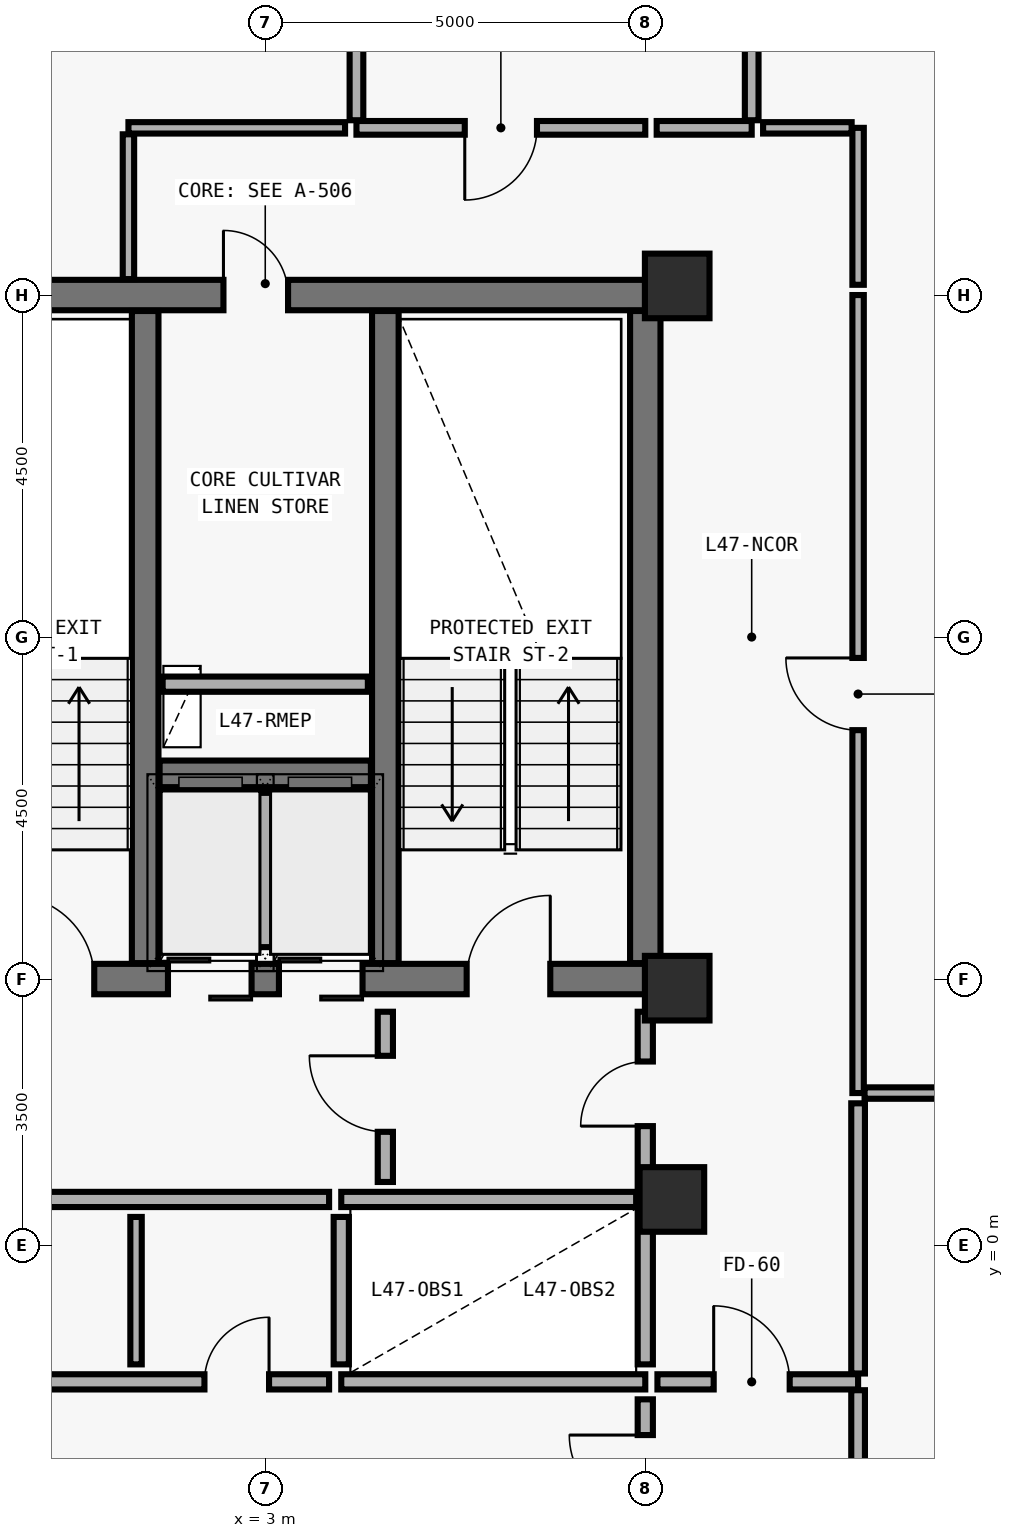
"""IFC4 building model, lengths in metres.
Left out: names, types, materials, properties, quantities, classifications, styles, units other than length and angle.
Written with IfcOpenShell. Run it as: python <this file> out.ifc"""

import sys

from ifc_helpers import new_model, si_unit, direction, frame, frame_2d, origin, origin_2d, place, context, subcontext, project, spatial, rectangle, extrude, element, fill, save


model = new_model("IFC4")
c1 = context("Model", 3, precision=1e-05, world=origin(), true_north=direction((0.0, 1.0)))
c2 = subcontext(c1, "Body", "Model", "MODEL_VIEW")
j1 = project(units=[si_unit("LENGTHUNIT", "METRE"), si_unit("PLANEANGLEUNIT", "RADIAN")], contexts=[c1])
p1 = place(None, origin())
s1 = spatial("IfcSite", under=j1, at=p1, CompositionType="ELEMENT")
p2 = place(p1, origin())
s2 = spatial("IfcBuilding", under=s1, at=p2, CompositionType="ELEMENT")
p3 = place(p2, frame((0.0, 0.0, 189.6)))
s3 = spatial("IfcBuildingStorey", under=s2, at=p3, CompositionType="ELEMENT", Elevation=189.6)
p4 = place(p3, frame((-2.0, 3.5, 0.0), z_axis=(0.0, 0.0, 1.0), x_axis=(1.0, 0.0, 0.0)))
e1 = element("IfcWall", 1, at=p4, inside=s3, PredefinedType="SHEAR", context=c2, shape_type="SweptSolid", body=[
    extrude(rectangle(XDim=10.0, YDim=0.4, at=frame_2d((5.0, 0.0))), origin(), (0.0, 0.0, 1.0), 3.592),
])
p5 = place(p4, frame((1.65, 0.0, 0.0)))
e2 = element("IfcOpeningElement", 2, at=p5, cuts=e1, PredefinedType="OPENING", context=c2, shape_type="SweptSolid", body=[
    extrude(rectangle(XDim=1.1, YDim=2.15, at=frame_2d((0.55, 1.075))), frame((0.0, 0.21, 0.0), z_axis=(0.0, -1.0, 0.0), x_axis=(1.0, 0.0, 0.0)), (0.0, 0.0, 1.0), 0.42),
])
p6 = place(p4, frame((7.65, 0.0, 0.0)))
e3 = element("IfcOpeningElement", 3, at=p6, cuts=e1, PredefinedType="OPENING", context=c2, shape_type="SweptSolid", body=[
    extrude(rectangle(XDim=1.1, YDim=2.15, at=frame_2d((0.55, 1.075))), frame((0.0, 0.21, 0.0), z_axis=(0.0, -1.0, 0.0), x_axis=(1.0, 0.0, 0.0)), (0.0, 0.0, 1.0), 0.42),
])
p7 = place(p4, frame((3.72, 0.0, 0.0)))
e4 = element("IfcOpeningElement", 4, at=p7, cuts=e1, PredefinedType="OPENING", context=c2, shape_type="SweptSolid", body=[
    extrude(rectangle(XDim=1.1, YDim=2.2, at=frame_2d((0.55, 1.1))), frame((0.0, 0.21, 0.0), z_axis=(0.0, -1.0, 0.0), x_axis=(1.0, 0.0, 0.0)), (0.0, 0.0, 1.0), 0.42),
])
p8 = place(p4, frame((5.18, 0.0, 0.0)))
e5 = element("IfcOpeningElement", 5, at=p8, cuts=e1, PredefinedType="OPENING", context=c2, shape_type="SweptSolid", body=[
    extrude(rectangle(XDim=1.1, YDim=2.2, at=frame_2d((0.55, 1.1))), frame((0.0, 0.21, 0.0), z_axis=(0.0, -1.0, 0.0), x_axis=(1.0, 0.0, 0.0)), (0.0, 0.0, 1.0), 0.42),
])
p9 = place(p3, frame((-2.0, 12.5, 0.0), z_axis=(0.0, 0.0, 1.0), x_axis=(1.0, 0.0, 0.0)))
e6 = element("IfcWall", 6, at=p9, inside=s3, PredefinedType="SHEAR", context=c2, shape_type="SweptSolid", body=[
    extrude(rectangle(XDim=10.0, YDim=0.4, at=frame_2d((5.0, 0.0))), origin(), (0.0, 0.0, 1.0), 3.592),
])
p10 = place(p9, frame((4.45, 0.0, 0.0)))
e7 = element("IfcOpeningElement", 7, at=p10, cuts=e6, PredefinedType="OPENING", context=c2, shape_type="SweptSolid", body=[
    extrude(rectangle(XDim=0.85, YDim=2.1, at=frame_2d((0.425, 1.05))), frame((0.0, 0.21, 0.0), z_axis=(0.0, -1.0, 0.0), x_axis=(1.0, 0.0, 0.0)), (0.0, 0.0, 1.0), 0.42),
])
p11 = place(p3, frame((8.0, 3.71, 0.0), z_axis=(0.0, 0.0, 1.0), x_axis=(0.0, 1.0, 0.0)))
e8 = element("IfcWall", 8, at=p11, inside=s3, PredefinedType="SHEAR", context=c2, shape_type="SweptSolid", body=[
    extrude(rectangle(XDim=8.58, YDim=0.4, at=frame_2d((4.29, 0.0))), origin(), (0.0, 0.0, 1.0), 3.592),
])
for number, where, z_axis, x_axis in (
    (9, (1.42, 3.71, 0.0), (0.0, 0.0, 1.0), (0.0, 1.0, 0.0)),
    (10, (4.58, 3.71, 0.0), (0.0, 0.0, 1.0), (0.0, 1.0, 0.0)),
):
    element("IfcWall", number, at=place(p3, frame(where, z_axis=z_axis, x_axis=x_axis)), inside=s3, PredefinedType="SHEAR", context=c2, shape_type="SweptSolid", body=[
        extrude(rectangle(XDim=8.58, YDim=0.35, at=frame_2d((4.29, 0.0))), origin(), (0.0, 0.0, 1.0), 3.592),
    ])
p12 = place(p3, frame((1.61, 6.2, 0.0), z_axis=(0.0, 0.0, 1.0), x_axis=(1.0, 0.0, 0.0)))
e11 = element("IfcWall", 11, at=p12, inside=s3, PredefinedType="SHEAR", context=c2, shape_type="SweptSolid", body=[
    extrude(rectangle(XDim=2.78, YDim=0.35, at=frame_2d((1.39, 0.0))), origin(), (0.0, 0.0, 1.0), 3.592),
])
for number, where, z_axis, x_axis in (
    (12, (8.42, 12.62, 0.0), (0.0, 0.0, 1.0), (1.0, 0.0, 0.0)),
    (13, (8.42, 3.38, 0.0), (0.0, 0.0, 1.0), (1.0, 0.0, 0.0)),
    (14, (8.35, 0.6, 0.0), (0.0, 0.0, 1.0), (1.0, 0.0, 0.0)),
):
    element("IfcColumn", number, at=place(p3, frame(where, z_axis=z_axis, x_axis=x_axis)), inside=s3, PredefinedType="COLUMN", context=c2, shape_type="SweptSolid", body=[
        extrude(rectangle(XDim=0.85, YDim=0.85, at=origin_2d()), origin(), (0.0, 0.0, 1.0), 3.575),
    ])
p13 = place(p3, frame((3.0, 3.92, 0.0), z_axis=(0.0, 0.0, 1.0), x_axis=(0.0, 1.0, 0.0)))
e15 = element("IfcWall", 15, at=p13, inside=s3, PredefinedType="SOLIDWALL", context=c2, shape_type="SweptSolid", body=[
    extrude(rectangle(XDim=2.03, YDim=0.2, at=frame_2d((1.015, 0.0))), origin(), (0.0, 0.0, 1.0), 3.36),
])
p14 = place(p3, frame((1.65, 7.38, 0.0), z_axis=(0.0, 0.0, 1.0), x_axis=(1.0, 0.0, 0.0)))
e16 = element("IfcWall", 16, at=p14, inside=s3, PredefinedType="SOLIDWALL", context=c2, shape_type="SweptSolid", body=[
    extrude(rectangle(XDim=2.7, YDim=0.2, at=frame_2d((1.35, 0.0))), origin(), (0.0, 0.0, 1.0), 3.36),
])
p15 = place(p3, frame((4.0, 0.6, 0.0), z_axis=(0.0, 0.0, 1.0), x_axis=(1.0, 0.0, 0.0)))
e17 = element("IfcWall", 17, at=p15, inside=s3, PredefinedType="SOLIDWALL", context=c2, shape_type="SweptSolid", body=[
    extrude(rectangle(XDim=3.88, YDim=0.2, at=frame_2d((1.94, 0.0))), origin(), (0.0, 0.0, 1.0), 3.012),
])
p16 = place(p3, frame((4.0, -1.8, 0.0), z_axis=(0.0, 0.0, 1.0), x_axis=(1.0, 0.0, 0.0)))
e18 = element("IfcWall", 18, at=p16, inside=s3, PredefinedType="SOLIDWALL", context=c2, shape_type="SweptSolid", body=[
    extrude(rectangle(XDim=4.0, YDim=0.2, at=frame_2d((2.0, 0.0))), origin(), (0.0, 0.0, 1.0), 3.36),
])
p17 = place(p3, frame((4.0, -1.57, 0.0), z_axis=(0.0, 0.0, 1.0), x_axis=(0.0, 1.0, 0.0)))
e19 = element("IfcWall", 19, at=p17, inside=s3, PredefinedType="SOLIDWALL", context=c2, shape_type="SweptSolid", body=[
    extrude(rectangle(XDim=1.94, YDim=0.2, at=frame_2d((0.97, 0.0))), origin(), (0.0, 0.0, 1.0), 3.36),
])
p18 = place(p3, frame((8.0, -1.57, 0.0), z_axis=(0.0, 0.0, 1.0), x_axis=(0.0, 1.0, 0.0)))
e20 = element("IfcWall", 20, at=p18, inside=s3, PredefinedType="SOLIDWALL", context=c2, shape_type="SweptSolid", body=[
    extrude(rectangle(XDim=2.05, YDim=0.2, at=frame_2d((1.025, 0.0))), origin(), (0.0, 0.0, 1.0), 3.012),
])
p19 = place(p3, frame((4.58, 0.83, 0.0), z_axis=(0.0, 0.0, 1.0), x_axis=(0.0, 1.0, 0.0)))
e21 = element("IfcWall", 21, at=p19, inside=s3, PredefinedType="MOVABLE", context=c2, shape_type="SweptSolid", body=[
    extrude(rectangle(XDim=2.24, YDim=0.2, at=frame_2d((1.12, 0.0))), origin(), (0.0, 0.0, 1.0), 3.36),
])
p20 = place(p19, frame((0.66, 0.0, 0.0)))
e22 = element("IfcOpeningElement", 22, at=p20, cuts=e21, PredefinedType="OPENING", context=c2, shape_type="SweptSolid", body=[
    extrude(rectangle(XDim=1.0, YDim=2.1, at=frame_2d((0.5, 1.05))), frame((0.0, 0.11, 0.0), z_axis=(0.0, -1.0, 0.0), x_axis=(1.0, 0.0, 0.0)), (0.0, 0.0, 1.0), 0.22),
])
p21 = place(p3, frame((8.0, 0.72, 0.0), z_axis=(0.0, 0.0, 1.0), x_axis=(0.0, 1.0, 0.0)))
e23 = element("IfcWall", 23, at=p21, inside=s3, PredefinedType="MOVABLE", context=c2, shape_type="SweptSolid", body=[
    extrude(rectangle(XDim=2.35, YDim=0.2, at=frame_2d((1.175, 0.0))), origin(), (0.0, 0.0, 1.0), 2.692),
])
p22 = place(p21, frame((0.845, 0.0, 0.0)))
e24 = element("IfcOpeningElement", 24, at=p22, cuts=e23, PredefinedType="OPENING", context=c2, shape_type="SweptSolid", body=[
    extrude(rectangle(XDim=0.85, YDim=2.1, at=frame_2d((0.425, 1.05))), frame((0.0, 0.11, 0.0), z_axis=(0.0, -1.0, 0.0), x_axis=(1.0, 0.0, 0.0)), (0.0, 0.0, 1.0), 0.22),
])
p23 = place(p3, frame((8.0, -3.97, 0.0), z_axis=(0.0, 0.0, 1.0), x_axis=(0.0, 1.0, 0.0)))
e25 = element("IfcWall", 25, at=p23, inside=s3, PredefinedType="MOVABLE", context=c2, shape_type="SweptSolid", body=[
    extrude(rectangle(XDim=1.94, YDim=0.2, at=frame_2d((0.97, 0.0))), origin(), (0.0, 0.0, 1.0), 3.012),
])
p24 = place(p23, frame((0.47, 0.0, 0.0)))
e26 = element("IfcOpeningElement", 26, at=p24, cuts=e25, PredefinedType="OPENING", context=c2, shape_type="SweptSolid", body=[
    extrude(rectangle(XDim=1.0, YDim=2.1, at=frame_2d((0.5, 1.05))), frame((0.0, 0.11, 0.0), z_axis=(0.0, -1.0, 0.0), x_axis=(1.0, 0.0, 0.0)), (0.0, 0.0, 1.0), 0.22),
])
p25 = place(p3, frame((-2.0, -1.8, 0.0), z_axis=(0.0, 0.0, 1.0), x_axis=(1.0, 0.0, 0.0)))
e27 = element("IfcWall", 27, at=p25, inside=s3, PredefinedType="MOVABLE", context=c2, shape_type="SweptSolid", body=[
    extrude(rectangle(XDim=5.84, YDim=0.2, at=frame_2d((2.92, 0.0))), origin(), (0.0, 0.0, 1.0), 3.36),
])
p26 = place(p25, frame((1.15, 0.0, 0.0)))
e28 = element("IfcOpeningElement", 28, at=p26, cuts=e27, PredefinedType="OPENING", context=c2, shape_type="SweptSolid", body=[
    extrude(rectangle(XDim=0.85, YDim=2.1, at=frame_2d((0.425, 1.05))), frame((0.0, 0.11, 0.0), z_axis=(0.0, -1.0, 0.0), x_axis=(1.0, 0.0, 0.0)), (0.0, 0.0, 1.0), 0.22),
])
p27 = place(p25, frame((4.2, 0.0, 0.0)))
e29 = element("IfcOpeningElement", 29, at=p27, cuts=e27, PredefinedType="OPENING", context=c2, shape_type="SweptSolid", body=[
    extrude(rectangle(XDim=0.85, YDim=2.1, at=frame_2d((0.425, 1.05))), frame((0.0, 0.11, 0.0), z_axis=(0.0, -1.0, 0.0), x_axis=(1.0, 0.0, 0.0)), (0.0, 0.0, 1.0), 0.22),
])
p28 = place(p3, frame((8.16, -1.8, 0.0), z_axis=(0.0, 0.0, 1.0), x_axis=(1.0, 0.0, 0.0)))
e30 = element("IfcWall", 30, at=p28, inside=s3, PredefinedType="MOVABLE", context=c2, shape_type="SweptSolid", body=[
    extrude(rectangle(XDim=2.64, YDim=0.2, at=frame_2d((1.32, 0.0))), origin(), (0.0, 0.0, 1.0), 3.36),
])
p29 = place(p28, frame((0.74, 0.0, 0.0)))
e31 = element("IfcOpeningElement", 31, at=p29, cuts=e30, PredefinedType="OPENING", context=c2, shape_type="SweptSolid", body=[
    extrude(rectangle(XDim=1.0, YDim=2.1, at=frame_2d((0.5, 1.05))), frame((0.0, 0.11, 0.0), z_axis=(0.0, -1.0, 0.0), x_axis=(1.0, 0.0, 0.0)), (0.0, 0.0, 1.0), 0.22),
])
p30 = place(p3, frame((8.0, 14.7, 0.0), z_axis=(0.0, 0.0, 1.0), x_axis=(-1.0, 0.0, 0.0)))
e32 = element("IfcWall", 32, at=p30, inside=s3, PredefinedType="PLUMBINGWALL", context=c2, shape_type="SweptSolid", body=[
    extrude(rectangle(XDim=3.8, YDim=0.18, at=frame_2d((1.9, 0.0))), origin(), (0.0, 0.0, 1.0), 3.012),
])
p31 = place(p30, frame((1.425, 0.0, 0.0)))
e33 = element("IfcOpeningElement", 33, at=p31, cuts=e32, PredefinedType="OPENING", context=c2, shape_type="SweptSolid", body=[
    extrude(rectangle(XDim=0.95, YDim=2.1, at=frame_2d((0.475, 1.05))), frame((0.0, 0.1, 0.0), z_axis=(0.0, -1.0, 0.0), x_axis=(1.0, 0.0, 0.0)), (0.0, 0.0, 1.0), 0.2),
])
p32 = place(p3, frame((10.8, -6.6, 0.0), z_axis=(0.0, 0.0, 1.0), x_axis=(0.0, 1.0, 0.0)))
e34 = element("IfcWall", 34, at=p32, inside=s3, PredefinedType="PLUMBINGWALL", context=c2, shape_type="SweptSolid", body=[
    extrude(rectangle(XDim=4.69, YDim=0.18, at=frame_2d((2.345, 0.0))), origin(), (0.0, 0.0, 1.0), 3.36),
])
p33 = place(p32, frame((1.925, 0.0, 0.0)))
e35 = element("IfcOpeningElement", 35, at=p33, cuts=e34, PredefinedType="OPENING", context=c2, shape_type="SweptSolid", body=[
    extrude(rectangle(XDim=0.95, YDim=2.1, at=frame_2d((0.475, 1.05))), frame((0.0, 0.1, 0.0), z_axis=(0.0, -1.0, 0.0), x_axis=(1.0, 0.0, 0.0)), (0.0, 0.0, 1.0), 0.2),
])
p34 = place(p3, frame((10.8, 2.0, 0.0), z_axis=(0.0, 0.0, 1.0), x_axis=(0.0, 1.0, 0.0)))
e36 = element("IfcWall", 36, at=p34, inside=s3, PredefinedType="PARTITIONING", context=c2, shape_type="SweptSolid", body=[
    extrude(rectangle(XDim=10.5, YDim=0.15, at=frame_2d((5.25, 0.0))), origin(), (0.0, 0.0, 1.0), 3.36),
])
p35 = place(p34, frame((4.775, 0.0, 0.0)))
e37 = element("IfcOpeningElement", 37, at=p35, cuts=e36, PredefinedType="OPENING", context=c2, shape_type="SweptSolid", body=[
    extrude(rectangle(XDim=0.95, YDim=2.1, at=frame_2d((0.475, 1.05))), frame((0.0, 0.085, 0.0), z_axis=(0.0, -1.0, 0.0), x_axis=(1.0, 0.0, 0.0)), (0.0, 0.0, 1.0), 0.17),
])
p36 = place(p3, frame((-1.88, 0.6, 0.0), z_axis=(0.0, 0.0, 1.0), x_axis=(1.0, 0.0, 0.0)))
e38 = element("IfcWall", 38, at=p36, inside=s3, PredefinedType="MOVABLE", context=c2, shape_type="SweptSolid", body=[
    extrude(rectangle(XDim=5.72, YDim=0.2, at=frame_2d((2.86, 0.0))), origin(), (0.0, 0.0, 1.0), 3.012),
])
p37 = place(p3, frame((1.3, -1.57, 0.0), z_axis=(0.0, 0.0, 1.0), x_axis=(0.0, 1.0, 0.0)))
e39 = element("IfcWall", 39, at=p37, inside=s3, PredefinedType="PARTITIONING", context=c2, shape_type="SweptSolid", body=[
    extrude(rectangle(XDim=1.94, YDim=0.15, at=frame_2d((0.97, 0.0))), origin(), (0.0, 0.0, 1.0), 3.36),
])
p38 = place(p3, frame((9.4, 14.7, 0.0), z_axis=(0.0, 0.0, 1.0), x_axis=(-1.0, 0.0, 0.0)))
e40 = element("IfcWall", 40, at=p38, inside=s3, PredefinedType="PLUMBINGWALL", context=c2, shape_type="SweptSolid", body=[
    extrude(rectangle(XDim=1.25, YDim=0.18, at=frame_2d((0.625, 0.0))), origin(), (0.0, 0.0, 1.0), 3.012),
])
p39 = place(p3, frame((4.05, 14.7, 0.0), z_axis=(0.0, 0.0, 1.0), x_axis=(-1.0, 0.0, 0.0)))
e41 = element("IfcWall", 41, at=p39, inside=s3, PredefinedType="PARTITIONING", context=c2, shape_type="SweptSolid", body=[
    extrude(rectangle(XDim=2.85, YDim=0.15, at=frame_2d((1.425, 0.0))), origin(), (0.0, 0.0, 1.0), 3.012),
])
p40 = place(p3, frame((1.2, 14.615, 0.0), z_axis=(0.0, 0.0, 1.0), x_axis=(0.0, -1.0, 0.0)))
e42 = element("IfcWall", 42, at=p40, inside=s3, PredefinedType="PARTITIONING", context=c2, shape_type="SweptSolid", body=[
    extrude(rectangle(XDim=1.905, YDim=0.15, at=frame_2d((0.953, 0.0))), origin(), (0.0, 0.0, 1.0), 3.36),
])
p41 = place(p3, frame((4.2, 18.838, 0.0), z_axis=(0.0, 0.0, 1.0), x_axis=(0.0, -1.0, 0.0)))
e43 = element("IfcWall", 43, at=p41, inside=s3, PredefinedType="PLUMBINGWALL", context=c2, shape_type="SweptSolid", body=[
    extrude(rectangle(XDim=4.038, YDim=0.18, at=frame_2d((2.019, 0.0))), origin(), (0.0, 0.0, 1.0), 3.36),
])
p42 = place(p3, frame((10.8, -1.69, 0.0), z_axis=(0.0, 0.0, 1.0), x_axis=(0.0, 1.0, 0.0)))
e44 = element("IfcWall", 44, at=p42, inside=s3, PredefinedType="PLUMBINGWALL", context=c2, shape_type="SweptSolid", body=[
    extrude(rectangle(XDim=3.555, YDim=0.18, at=frame_2d((1.777, 0.0))), origin(), (0.0, 0.0, 1.0), 3.36),
])
p43 = place(p3, frame((10.885, 2.0, 0.0), z_axis=(0.0, 0.0, 1.0), x_axis=(1.0, 0.0, 0.0)))
e45 = element("IfcWall", 45, at=p43, inside=s3, PredefinedType="PARTITIONING", context=c2, shape_type="SweptSolid", body=[
    extrude(rectangle(XDim=13.559, YDim=0.15, at=frame_2d((6.78, 0.0))), origin(), (0.0, 0.0, 1.0), 3.36),
])
p44 = place(p3, frame((10.8, 12.635, 0.0), z_axis=(0.0, 0.0, 1.0), x_axis=(0.0, 1.0, 0.0)))
e46 = element("IfcWall", 46, at=p44, inside=s3, PredefinedType="PARTITIONING", context=c2, shape_type="SweptSolid", body=[
    extrude(rectangle(XDim=2.065, YDim=0.15, at=frame_2d((1.032, 0.0))), origin(), (0.0, 0.0, 1.0), 3.36),
])
p45 = place(p3, frame((10.715, 14.7, 0.0), z_axis=(0.0, 0.0, 1.0), x_axis=(-1.0, 0.0, 0.0)))
e47 = element("IfcWall", 47, at=p45, inside=s3, PredefinedType="PARTITIONING", context=c2, shape_type="SweptSolid", body=[
    extrude(rectangle(XDim=1.165, YDim=0.15, at=frame_2d((0.583, 0.0))), origin(), (0.0, 0.0, 1.0), 3.012),
])
p46 = place(p3, frame((9.4, 14.8, 0.0), z_axis=(0.0, 0.0, 1.0), x_axis=(0.0, 1.0, 0.0)))
e48 = element("IfcWall", 48, at=p46, inside=s3, PredefinedType="PLUMBINGWALL", context=c2, shape_type="SweptSolid", body=[
    extrude(rectangle(XDim=3.515, YDim=0.18, at=frame_2d((1.757, 0.0))), origin(), (0.0, 0.0, 1.0), 3.36),
])
p47 = place(p5, origin())
e49 = element("IfcDoor", 49, at=p47, inside=s3, OperationType="SINGLE_SWING_LEFT", PredefinedType="DOOR", context=c2, shape_type="SweptSolid", body=[
    extrude(rectangle(XDim=1.1, YDim=2.15, at=frame_2d((0.55, 1.075))), frame((0.0, 0.025, 0.0), z_axis=(0.0, -1.0, 0.0), x_axis=(1.0, 0.0, 0.0)), (0.0, 0.0, 1.0), 0.05),
])
fill(e2, e49)
p48 = place(p6, origin())
e50 = element("IfcDoor", 50, at=p48, inside=s3, OperationType="SINGLE_SWING_RIGHT", PredefinedType="DOOR", context=c2, shape_type="SweptSolid", body=[
    extrude(rectangle(XDim=1.1, YDim=2.15, at=frame_2d((0.55, 1.075))), frame((0.0, 0.025, 0.0), z_axis=(0.0, -1.0, 0.0), x_axis=(1.0, 0.0, 0.0)), (0.0, 0.0, 1.0), 0.05),
])
fill(e3, e50)
p49 = place(p7, origin())
e51 = element("IfcDoor", 51, at=p49, inside=s3, OperationType="DOUBLE_DOOR_SLIDING", PredefinedType="DOOR", context=c2, shape_type="SweptSolid", body=[
    extrude(rectangle(XDim=1.1, YDim=2.2, at=frame_2d((0.55, 1.1))), frame((0.0, 0.025, 0.0), z_axis=(0.0, -1.0, 0.0), x_axis=(1.0, 0.0, 0.0)), (0.0, 0.0, 1.0), 0.05),
])
fill(e4, e51)
p50 = place(p8, origin())
e52 = element("IfcDoor", 52, at=p50, inside=s3, OperationType="DOUBLE_DOOR_SLIDING", PredefinedType="DOOR", context=c2, shape_type="SweptSolid", body=[
    extrude(rectangle(XDim=1.1, YDim=2.2, at=frame_2d((0.55, 1.1))), frame((0.0, 0.025, 0.0), z_axis=(0.0, -1.0, 0.0), x_axis=(1.0, 0.0, 0.0)), (0.0, 0.0, 1.0), 0.05),
])
fill(e5, e52)
p51 = place(p10, origin())
e53 = element("IfcDoor", 53, at=p51, inside=s3, OperationType="SINGLE_SWING_LEFT", PredefinedType="DOOR", context=c2, shape_type="SweptSolid", body=[
    extrude(rectangle(XDim=0.85, YDim=2.1, at=frame_2d((0.425, 1.05))), frame((0.0, 0.025, 0.0), z_axis=(0.0, -1.0, 0.0), x_axis=(1.0, 0.0, 0.0)), (0.0, 0.0, 1.0), 0.05),
])
fill(e7, e53)
p52 = place(p20, origin())
e54 = element("IfcDoor", 54, at=p52, inside=s3, OperationType="SINGLE_SWING_RIGHT", PredefinedType="DOOR", context=c2, shape_type="SweptSolid", body=[
    extrude(rectangle(XDim=1.0, YDim=2.1, at=frame_2d((0.5, 1.05))), frame((0.0, 0.025, 0.0), z_axis=(0.0, -1.0, 0.0), x_axis=(1.0, 0.0, 0.0)), (0.0, 0.0, 1.0), 0.05),
])
fill(e22, e54)
p53 = place(p22, origin())
e55 = element("IfcDoor", 55, at=p53, inside=s3, OperationType="SINGLE_SWING_LEFT", PredefinedType="DOOR", context=c2, shape_type="SweptSolid", body=[
    extrude(rectangle(XDim=0.85, YDim=2.1, at=frame_2d((0.425, 1.05))), frame((0.0, 0.025, 0.0), z_axis=(0.0, -1.0, 0.0), x_axis=(1.0, 0.0, 0.0)), (0.0, 0.0, 1.0), 0.05),
])
fill(e24, e55)
p54 = place(p24, origin())
e56 = element("IfcDoor", 56, at=p54, inside=s3, OperationType="SINGLE_SWING_RIGHT", PredefinedType="DOOR", context=c2, shape_type="SweptSolid", body=[
    extrude(rectangle(XDim=1.0, YDim=2.1, at=frame_2d((0.5, 1.05))), frame((0.0, 0.025, 0.0), z_axis=(0.0, -1.0, 0.0), x_axis=(1.0, 0.0, 0.0)), (0.0, 0.0, 1.0), 0.05),
])
fill(e26, e56)
p55 = place(p27, origin())
e57 = element("IfcDoor", 57, at=p55, inside=s3, OperationType="SINGLE_SWING_RIGHT", PredefinedType="DOOR", context=c2, shape_type="SweptSolid", body=[
    extrude(rectangle(XDim=0.85, YDim=2.1, at=frame_2d((0.425, 1.05))), frame((0.0, 0.025, 0.0), z_axis=(0.0, -1.0, 0.0), x_axis=(1.0, 0.0, 0.0)), (0.0, 0.0, 1.0), 0.05),
])
fill(e29, e57)
p56 = place(p29, origin())
e58 = element("IfcDoor", 58, at=p56, inside=s3, OperationType="SINGLE_SWING_LEFT", PredefinedType="DOOR", context=c2, shape_type="SweptSolid", body=[
    extrude(rectangle(XDim=1.0, YDim=2.1, at=frame_2d((0.5, 1.05))), frame((0.0, 0.025, 0.0), z_axis=(0.0, -1.0, 0.0), x_axis=(1.0, 0.0, 0.0)), (0.0, 0.0, 1.0), 0.05),
])
fill(e31, e58)
p57 = place(p31, origin())
e59 = element("IfcDoor", 59, at=p57, inside=s3, OperationType="SINGLE_SWING_RIGHT", PredefinedType="DOOR", context=c2, shape_type="SweptSolid", body=[
    extrude(rectangle(XDim=0.95, YDim=2.1, at=frame_2d((0.475, 1.05))), frame((0.0, 0.025, 0.0), z_axis=(0.0, -1.0, 0.0), x_axis=(1.0, 0.0, 0.0)), (0.0, 0.0, 1.0), 0.05),
])
fill(e33, e59)
p58 = place(p35, origin())
e60 = element("IfcDoor", 60, at=p58, inside=s3, OperationType="SINGLE_SWING_RIGHT", PredefinedType="DOOR", context=c2, shape_type="SweptSolid", body=[
    extrude(rectangle(XDim=0.95, YDim=2.1, at=frame_2d((0.475, 1.05))), frame((0.0, 0.025, 0.0), z_axis=(0.0, -1.0, 0.0), x_axis=(1.0, 0.0, 0.0)), (0.0, 0.0, 1.0), 0.05),
])
fill(e37, e60)
save(model, sys.argv[1])
